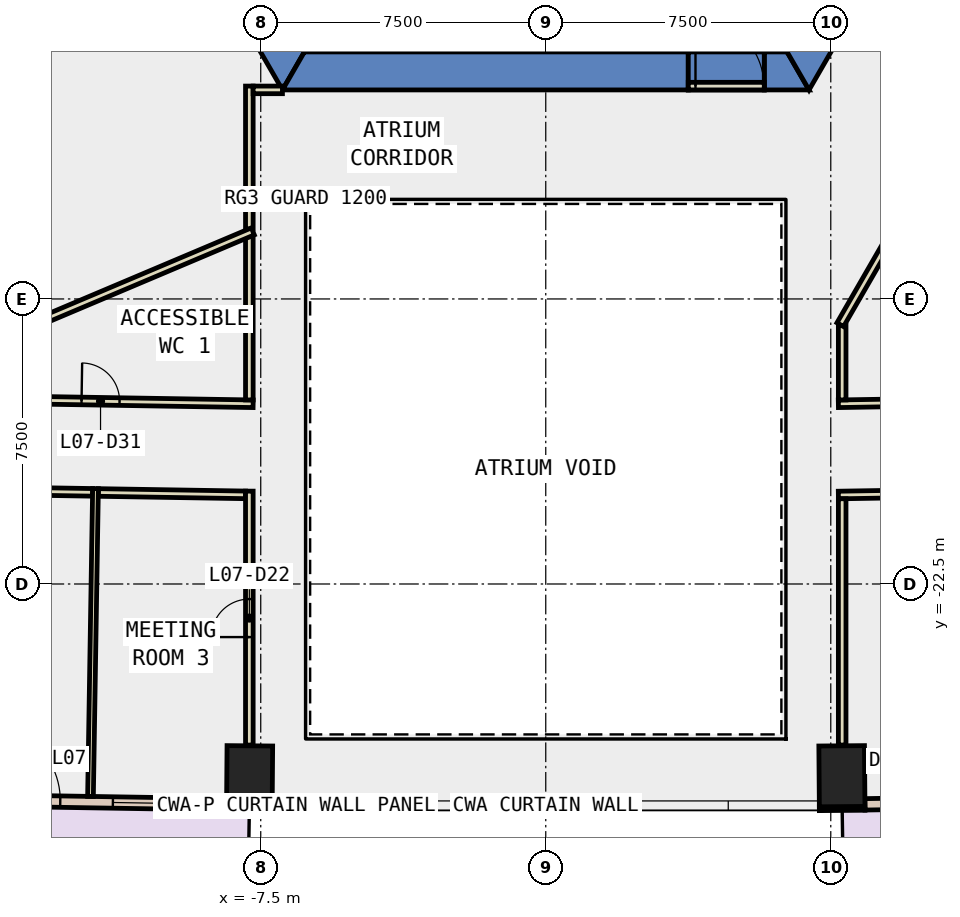
"""IFC4 building model, lengths in metres.
Left out: names, types, materials, properties, quantities, classifications, styles, units other than length and angle.
Written with IfcOpenShell. Run it as: python <this file> out.ifc"""

import sys

from ifc_helpers import new_model, si_unit, direction, frame, frame_2d, origin, origin_2d, place, context, subcontext, project, spatial, polyline, rectangle, outline, extrude, element, fill, save


model = new_model("IFC4")
c1 = context("Model", 3, precision=1e-05, world=origin(), true_north=direction((0.0, 1.0)))
c2 = subcontext(c1, "Body", "Model", "MODEL_VIEW")
j1 = project(units=[si_unit("LENGTHUNIT", "METRE"), si_unit("PLANEANGLEUNIT", "RADIAN")], contexts=[c1])
p1 = place(None, origin())
s1 = spatial("IfcSite", under=j1, at=p1, CompositionType="ELEMENT")
p2 = place(p1, origin())
s2 = spatial("IfcBuilding", under=s1, at=p2, CompositionType="ELEMENT")
p3 = place(p2, frame((0.0, 0.0, 39.2)))
s3 = spatial("IfcBuildingStorey", under=s2, at=p3, CompositionType="ELEMENT", Elevation=39.2)
for number, where, z_axis, x_axis in (
    (1, (-7.793, -27.558, -0.4), (0.0, 0.0, 1.0), (-1.0, 0.008, 0.0)),
    (2, (7.793, -27.558, -0.4), (0.0, 0.0, 1.0), (1.0, 0.008, 0.0)),
):
    element("IfcColumn", number, at=place(p3, frame(where, z_axis=z_axis, x_axis=x_axis)), inside=s3, PredefinedType="COLUMN", context=c2, shape_type="SweptSolid", body=[
        extrude(rectangle(XDim=1.2, YDim=1.6, at=origin_2d()), origin(), (0.0, 0.0, 1.0), 4.2),
    ])
p4 = place(p3, frame((0.0, 0.0, -0.4)))
e3 = element("IfcWall", 3, at=p4, inside=s3, PredefinedType="SHEAR", context=c2, shape_type="SweptSolid", body=[
    extrude(outline(polyline([(-13.856, 2.5), (-6.928, -9.5), (-6.351, -8.5), (-12.702, 2.5), (-13.856, 2.5)])), origin(), (0.0, 0.0, 1.0), 4.2),
])
p5 = place(p3, frame((0.0, 0.0, -0.4)))
e4 = element("IfcWall", 4, at=p5, inside=s3, PredefinedType="SHEAR", context=c2, shape_type="SweptSolid", body=[
    extrude(outline(polyline([(3.75, -9.5), (3.75, -8.5), (-6.351, -8.5), (-6.928, -9.5), (3.75, -9.5)])), origin(), (0.0, 0.0, 1.0), 4.2),
])
p6 = place(p3, frame((0.0, 0.0, -0.4)))
e5 = element("IfcWall", 5, at=p6, inside=s3, PredefinedType="SHEAR", context=c2, shape_type="SweptSolid", body=[
    extrude(outline(polyline([(5.75, -8.5), (5.75, -9.5), (6.928, -9.5), (6.351, -8.5), (5.75, -8.5)])), origin(), (0.0, 0.0, 1.0), 4.2),
])
p7 = place(p3, frame((0.0, 0.0, 3.6)))
e6 = element("IfcWall", 6, at=p7, inside=s3, PredefinedType="SHEAR", context=c2, shape_type="SweptSolid", body=[
    extrude(outline(polyline([(5.75, -9.5), (5.75, -8.5), (3.75, -8.5), (3.75, -9.5), (5.75, -9.5)])), origin(), (0.0, 0.0, 1.0), 0.2),
])
p8 = place(p3, frame((0.0, 0.0, -0.4)))
e7 = element("IfcWall", 7, at=p8, inside=s3, PredefinedType="SHEAR", context=c2, shape_type="SweptSolid", body=[
    extrude(outline(polyline([(8.117, -7.44), (7.252, -6.94), (6.351, -8.5), (6.928, -9.5), (8.117, -7.44)])), origin(), (0.0, 0.0, 1.0), 4.2),
])
p9 = place(p3, frame((-9.31, -5.375, -0.4), z_axis=(0.0, 0.0, 1.0), x_axis=(-0.866017533419, -0.500013631625, 0.0)))
e8 = element("IfcWall", 8, at=p9, inside=s3, PredefinedType="SHEAR", context=c2, shape_type="SweptSolid", body=[
    extrude(rectangle(XDim=9.0, YDim=0.8, at=frame_2d((4.5, 0.0))), origin(), (0.0, 0.0, 1.0), 4.2),
])
for number, where, z_axis, x_axis in (
    (9, (-8.4, -28.403, 0.0), (0.0, 0.0, 1.0), (1.0, -0.008, 0.0)),
    (10, (7.2, -28.413, 0.0), (0.0, 0.0, 1.0), (1.0, 0.008, 0.0)),
):
    element("IfcWall", number, at=place(p3, frame(where, z_axis=z_axis, x_axis=x_axis)), inside=s3, PredefinedType="STANDARD", context=c2, shape_type="SweptSolid", body=[
        extrude(rectangle(XDim=1.2, YDim=0.1, at=frame_2d((0.6, 0.0))), origin(), (0.0, 0.0, 1.0), 3.8),
    ])
p10 = place(p3, frame((-15.568, -28.181, 0.0), z_axis=(0.0, 0.0, 1.0), x_axis=(0.999866467443, -0.016341581408, 0.0)))
e11 = element("IfcWall", 11, at=p10, inside=s3, PredefinedType="STANDARD", context=c2, shape_type="SweptSolid", body=[
    extrude(rectangle(XDim=7.171, YDim=0.3, at=frame_2d((3.585, 0.0))), origin(), (0.0, 0.0, 1.0), 3.8),
])
p11 = place(p10, frame((0.793, 0.0, 0.0)))
e12 = element("IfcOpeningElement", 12, at=p11, cuts=e11, PredefinedType="OPENING", context=c2, shape_type="SweptSolid", body=[
    extrude(rectangle(XDim=2.0, YDim=2.4, at=frame_2d((1.0, 1.2))), frame((0.0, 0.16, 0.0), z_axis=(0.0, -1.0, 0.0), x_axis=(1.0, 0.0, 0.0)), (0.0, 0.0, 1.0), 0.32),
])
p12 = place(p10, frame((4.178, 0.0, 0.9)))
e13 = element("IfcOpeningElement", 13, at=p12, cuts=e11, PredefinedType="OPENING", context=c2, shape_type="SweptSolid", body=[
    extrude(rectangle(XDim=2.4, YDim=2.6, at=frame_2d((1.2, 1.3))), frame((0.0, 0.16, 0.0), z_axis=(0.0, -1.0, 0.0), x_axis=(1.0, 0.0, 0.0)), (0.0, 0.0, 1.0), 0.32),
])
p13 = place(p3, frame((8.398, -28.298, 0.0), z_axis=(0.0, 0.0, 1.0), x_axis=(0.999866467443, 0.016341581408, 0.0)))
e14 = element("IfcWall", 14, at=p13, inside=s3, PredefinedType="STANDARD", context=c2, shape_type="SweptSolid", body=[
    extrude(rectangle(XDim=7.171, YDim=0.3, at=frame_2d((3.585, 0.0))), origin(), (0.0, 0.0, 1.0), 3.8),
])
p14 = place(p13, frame((0.793, 0.0, 0.0)))
e15 = element("IfcOpeningElement", 15, at=p14, cuts=e14, PredefinedType="OPENING", context=c2, shape_type="SweptSolid", body=[
    extrude(rectangle(XDim=2.0, YDim=2.4, at=frame_2d((1.0, 1.2))), frame((0.0, 0.16, 0.0), z_axis=(0.0, -1.0, 0.0), x_axis=(1.0, 0.0, 0.0)), (0.0, 0.0, 1.0), 0.32),
])
p15 = place(p13, frame((4.178, 0.0, 0.9)))
e16 = element("IfcOpeningElement", 16, at=p15, cuts=e14, PredefinedType="OPENING", context=c2, shape_type="SweptSolid", body=[
    extrude(rectangle(XDim=2.4, YDim=2.6, at=frame_2d((1.2, 1.3))), frame((0.0, 0.16, 0.0), z_axis=(0.0, -1.0, 0.0), x_axis=(1.0, 0.0, 0.0)), (0.0, 0.0, 1.0), 0.32),
])
p16 = place(p3, frame((7.7, -17.758, 0.0), z_axis=(0.0, 0.0, 1.0), x_axis=(0.999865574926, 0.016396099485, 0.0)))
e17 = element("IfcWall", 17, at=p16, inside=s3, PredefinedType="PARTITIONING", context=c2, shape_type="SweptSolid", body=[
    extrude(rectangle(XDim=8.234, YDim=0.2, at=frame_2d((4.117, 0.0))), origin(), (0.0, 0.0, 1.0), 3.8),
])
p17 = place(p3, frame((-15.73, -17.627, 0.0), z_axis=(0.0, 0.0, 1.0), x_axis=(0.999866746812, -0.016324479129, 0.0)))
e18 = element("IfcWall", 18, at=p17, inside=s3, PredefinedType="PARTITIONING", context=c2, shape_type="SweptSolid", body=[
    extrude(rectangle(XDim=8.031, YDim=0.2, at=frame_2d((4.016, 0.0))), origin(), (0.0, 0.0, 1.0), 3.8),
])
p18 = place(p17, frame((3.515, 0.0, 0.0)))
e19 = element("IfcOpeningElement", 19, at=p18, cuts=e18, PredefinedType="OPENING", context=c2, shape_type="SweptSolid", body=[
    extrude(rectangle(XDim=1.0, YDim=2.1, at=frame_2d((0.5, 1.05))), frame((0.0, 0.11, 0.0), z_axis=(0.0, -1.0, 0.0), x_axis=(1.0, 0.0, 0.0)), (0.0, 0.0, 1.0), 0.22),
])
p19 = place(p3, frame((16.061, -20.022, 0.0), z_axis=(0.0, 0.0, 1.0), x_axis=(-0.999865858466, -0.016378799504, 0.0)))
e20 = element("IfcWall", 20, at=p19, inside=s3, PredefinedType="PARTITIONING", context=c2, shape_type="SweptSolid", body=[
    extrude(rectangle(XDim=8.362, YDim=0.2, at=frame_2d((4.181, 0.0))), origin(), (0.0, 0.0, 1.0), 3.8),
])
p20 = place(p19, frame((3.681, 0.0, 0.0)))
e21 = element("IfcOpeningElement", 21, at=p20, cuts=e20, PredefinedType="OPENING", context=c2, shape_type="SweptSolid", body=[
    extrude(rectangle(XDim=1.0, YDim=2.1, at=frame_2d((0.5, 1.05))), frame((0.0, 0.11, 0.0), z_axis=(0.0, -1.0, 0.0), x_axis=(1.0, 0.0, 0.0)), (0.0, 0.0, 1.0), 0.22),
])
p21 = place(p3, frame((-11.924, -20.089, 0.0), z_axis=(0.0, 0.0, 1.0), x_axis=(-0.999867376665, 0.016285855216, 0.0)))
e22 = element("IfcWall", 22, at=p21, inside=s3, PredefinedType="PARTITIONING", context=c2, shape_type="SweptSolid", body=[
    extrude(rectangle(XDim=4.062, YDim=0.2, at=frame_2d((2.031, 0.0))), origin(), (0.0, 0.0, 1.0), 3.8),
])
p22 = place(p3, frame((-7.9, -20.155, 0.0), z_axis=(0.0, 0.0, 1.0), x_axis=(-0.999867846419, 0.016256989184, 0.0)))
e23 = element("IfcWall", 23, at=p22, inside=s3, PredefinedType="PARTITIONING", context=c2, shape_type="SweptSolid", body=[
    extrude(rectangle(XDim=3.875, YDim=0.2, at=frame_2d((1.937, 0.0))), origin(), (0.0, 0.0, 1.0), 3.8),
])
p23 = place(p3, frame((7.8, -15.69, 0.0), z_axis=(0.0, 0.0, 1.0), x_axis=(0.0, -1.0, 0.0)))
e24 = element("IfcWall", 24, at=p23, inside=s3, PredefinedType="PARTITIONING", context=c2, shape_type="SweptSolid", body=[
    extrude(rectangle(XDim=1.967, YDim=0.2, at=frame_2d((0.983, 0.0))), origin(), (0.0, 0.0, 1.0), 3.8),
])
p24 = place(p3, frame((-7.8, -13.161, 0.0), z_axis=(0.0, 0.0, 1.0), x_axis=(0.0, 1.0, 0.0)))
e25 = element("IfcWall", 25, at=p24, inside=s3, PredefinedType="PARTITIONING", context=c2, shape_type="SweptSolid", body=[
    extrude(rectangle(XDim=3.762, YDim=0.2, at=frame_2d((1.881, 0.0))), origin(), (0.0, 0.0, 1.0), 3.8),
])
p25 = place(p3, frame((-7.7, -9.499, 0.0), z_axis=(0.0, 0.0, 1.0), x_axis=(1.0, 0.0, 0.0)))
e26 = element("IfcWall", 26, at=p25, inside=s3, PredefinedType="PARTITIONING", context=c2, shape_type="SweptSolid", body=[
    extrude(rectangle(XDim=0.771, YDim=0.2, at=frame_2d((0.385, 0.0))), origin(), (0.0, 0.0, 1.0), 3.8),
])
p26 = place(p3, frame((-7.8, -17.657, 0.0), z_axis=(0.0, 0.0, 1.0), x_axis=(0.0, 1.0, 0.0)))
e27 = element("IfcWall", 27, at=p26, inside=s3, PredefinedType="PARTITIONING", context=c2, shape_type="SweptSolid", body=[
    extrude(rectangle(XDim=4.296, YDim=0.2, at=frame_2d((2.148, 0.0))), origin(), (0.0, 0.0, 1.0), 3.8),
])
p27 = place(p3, frame((7.8, -20.257, 0.0), z_axis=(0.0, 0.0, 1.0), x_axis=(0.0, -1.0, 0.0)))
e28 = element("IfcWall", 28, at=p27, inside=s3, PredefinedType="PARTITIONING", context=c2, shape_type="SweptSolid", body=[
    extrude(rectangle(XDim=6.481, YDim=0.2, at=frame_2d((3.24, 0.0))), origin(), (0.0, 0.0, 1.0), 3.8),
])
p28 = place(p3, frame((-7.8, -26.738, 0.0), z_axis=(0.0, 0.0, 1.0), x_axis=(0.0, 1.0, 0.0)))
e29 = element("IfcWall", 29, at=p28, inside=s3, PredefinedType="PARTITIONING", context=c2, shape_type="SweptSolid", body=[
    extrude(rectangle(XDim=6.681, YDim=0.2, at=frame_2d((3.341, 0.0))), origin(), (0.0, 0.0, 1.0), 3.8),
])
p29 = place(p28, frame((2.841, 0.0, 0.0)))
e30 = element("IfcOpeningElement", 30, at=p29, cuts=e29, PredefinedType="OPENING", context=c2, shape_type="SweptSolid", body=[
    extrude(rectangle(XDim=1.0, YDim=2.1, at=frame_2d((0.5, 1.05))), frame((0.0, 0.11, 0.0), z_axis=(0.0, -1.0, 0.0), x_axis=(1.0, 0.0, 0.0)), (0.0, 0.0, 1.0), 0.22),
])
p30 = place(p3, frame((-7.708, -13.222, 0.0), z_axis=(0.0, 0.0, 1.0), x_axis=(-0.921093468555, -0.389341523839, 0.0)))
e31 = element("IfcWall", 31, at=p30, inside=s3, PredefinedType="PARTITIONING", context=c2, shape_type="SweptSolid", body=[
    extrude(rectangle(XDim=9.233, YDim=0.2, at=frame_2d((4.617, 0.0))), origin(), (0.0, 0.0, 1.0), 3.8),
])
p31 = place(p3, frame((-11.848, -19.991, 0.0), z_axis=(0.0, 0.0, 1.0), x_axis=(-0.016305783899, -0.999867051868, 0.0)))
e32 = element("IfcWall", 32, at=p31, inside=s3, PredefinedType="PARTITIONING", context=c2, shape_type="SweptSolid", body=[
    extrude(rectangle(XDim=8.1, YDim=0.15, at=frame_2d((4.05, 0.0))), origin(), (0.0, 0.0, 1.0), 3.8),
])
p32 = place(p3, frame((3.75, -9.4, 0.0), z_axis=(0.0, 0.0, 1.0), x_axis=(1.0, 0.0, 0.0)))
e33 = element("IfcWall", 33, at=p32, inside=s3, PredefinedType="PARTITIONING", context=c2, shape_type="SweptSolid", body=[
    extrude(rectangle(XDim=2.0, YDim=0.2, at=frame_2d((1.0, 0.0))), origin(), (0.0, 0.0, 1.0), 2.4),
])
p33 = place(p32, frame((0.19, 0.0, 0.0)))
e34 = element("IfcOpeningElement", 34, at=p33, cuts=e33, PredefinedType="OPENING", context=c2, shape_type="SweptSolid", body=[
    extrude(rectangle(XDim=1.8, YDim=2.1, at=frame_2d((0.9, 1.05))), frame((0.0, 0.11, 0.0), z_axis=(0.0, -1.0, 0.0), x_axis=(1.0, 0.0, 0.0)), (0.0, 0.0, 1.0), 0.22),
])
p34 = place(p3, frame((12.401, -7.621, 0.0), z_axis=(0.0, 0.0, 1.0), x_axis=(-0.499983724212, -0.866034800411, 0.0)))
e35 = element("IfcWall", 35, at=p34, inside=s3, PredefinedType="PARTITIONING", context=c2, shape_type="SweptSolid", body=[
    extrude(rectangle(XDim=9.302, YDim=0.2, at=frame_2d((4.651, 0.0))), origin(), (0.0, 0.0, 1.0), 3.8),
])
p35 = place(p34, frame((1.429, 0.0, 0.0)))
e36 = element("IfcOpeningElement", 36, at=p35, cuts=e35, PredefinedType="OPENING", context=c2, shape_type="SweptSolid", body=[
    extrude(rectangle(XDim=1.0, YDim=2.1, at=frame_2d((0.5, 1.05))), frame((0.0, 0.11, 0.0), z_axis=(0.0, -1.0, 0.0), x_axis=(1.0, 0.0, 0.0)), (0.0, 0.0, 1.0), 0.22),
])
p36 = place(p34, frame((2.529, 0.0, 0.0)))
e37 = element("IfcOpeningElement", 37, at=p36, cuts=e35, PredefinedType="OPENING", context=c2, shape_type="SweptSolid", body=[
    extrude(rectangle(XDim=1.0, YDim=2.1, at=frame_2d((0.5, 1.05))), frame((0.0, 0.11, 0.0), z_axis=(0.0, -1.0, 0.0), x_axis=(1.0, 0.0, 0.0)), (0.0, 0.0, 1.0), 0.22),
])
p37 = place(p11, origin())
e38 = element("IfcDoor", 38, at=p37, inside=s3, OperationType="SLIDING_TO_LEFT", PredefinedType="DOOR", context=c2, shape_type="SweptSolid", body=[
    extrude(rectangle(XDim=2.0, YDim=2.4, at=frame_2d((1.0, 1.2))), frame((0.0, 0.025, 0.0), z_axis=(0.0, -1.0, 0.0), x_axis=(1.0, 0.0, 0.0)), (0.0, 0.0, 1.0), 0.05),
])
fill(e12, e38)
p38 = place(p12, origin())
e39 = element("IfcWindow", 39, at=p38, inside=s3, PartitioningType="SINGLE_PANEL", PredefinedType="WINDOW", context=c2, shape_type="SweptSolid", body=[
    extrude(rectangle(XDim=2.4, YDim=2.6, at=frame_2d((1.2, 1.3))), frame((0.0, 0.03, 0.0), z_axis=(0.0, -1.0, 0.0), x_axis=(1.0, 0.0, 0.0)), (0.0, 0.0, 1.0), 0.06),
])
fill(e13, e39)
p39 = place(p29, origin())
e40 = element("IfcDoor", 40, at=p39, inside=s3, OperationType="SINGLE_SWING_LEFT", PredefinedType="DOOR", context=c2, shape_type="SweptSolid", body=[
    extrude(rectangle(XDim=1.0, YDim=2.1, at=frame_2d((0.5, 1.05))), frame((0.0, 0.025, 0.0), z_axis=(0.0, -1.0, 0.0), x_axis=(1.0, 0.0, 0.0)), (0.0, 0.0, 1.0), 0.05),
])
fill(e30, e40)
p40 = place(p18, origin())
e41 = element("IfcDoor", 41, at=p40, inside=s3, OperationType="SINGLE_SWING_LEFT", PredefinedType="DOOR", context=c2, shape_type="SweptSolid", body=[
    extrude(rectangle(XDim=1.0, YDim=2.1, at=frame_2d((0.5, 1.05))), frame((0.0, 0.025, 0.0), z_axis=(0.0, -1.0, 0.0), x_axis=(1.0, 0.0, 0.0)), (0.0, 0.0, 1.0), 0.05),
])
fill(e19, e41)
p41 = place(p33, origin())
e42 = element("IfcDoor", 42, at=p41, inside=s3, OperationType="DOUBLE_DOOR_SINGLE_SWING", PredefinedType="DOOR", context=c2, shape_type="SweptSolid", body=[
    extrude(rectangle(XDim=1.8, YDim=2.1, at=frame_2d((0.9, 1.05))), frame((0.0, 0.025, 0.0), z_axis=(0.0, -1.0, 0.0), x_axis=(1.0, 0.0, 0.0)), (0.0, 0.0, 1.0), 0.05),
])
fill(e34, e42)
save(model, sys.argv[1])
